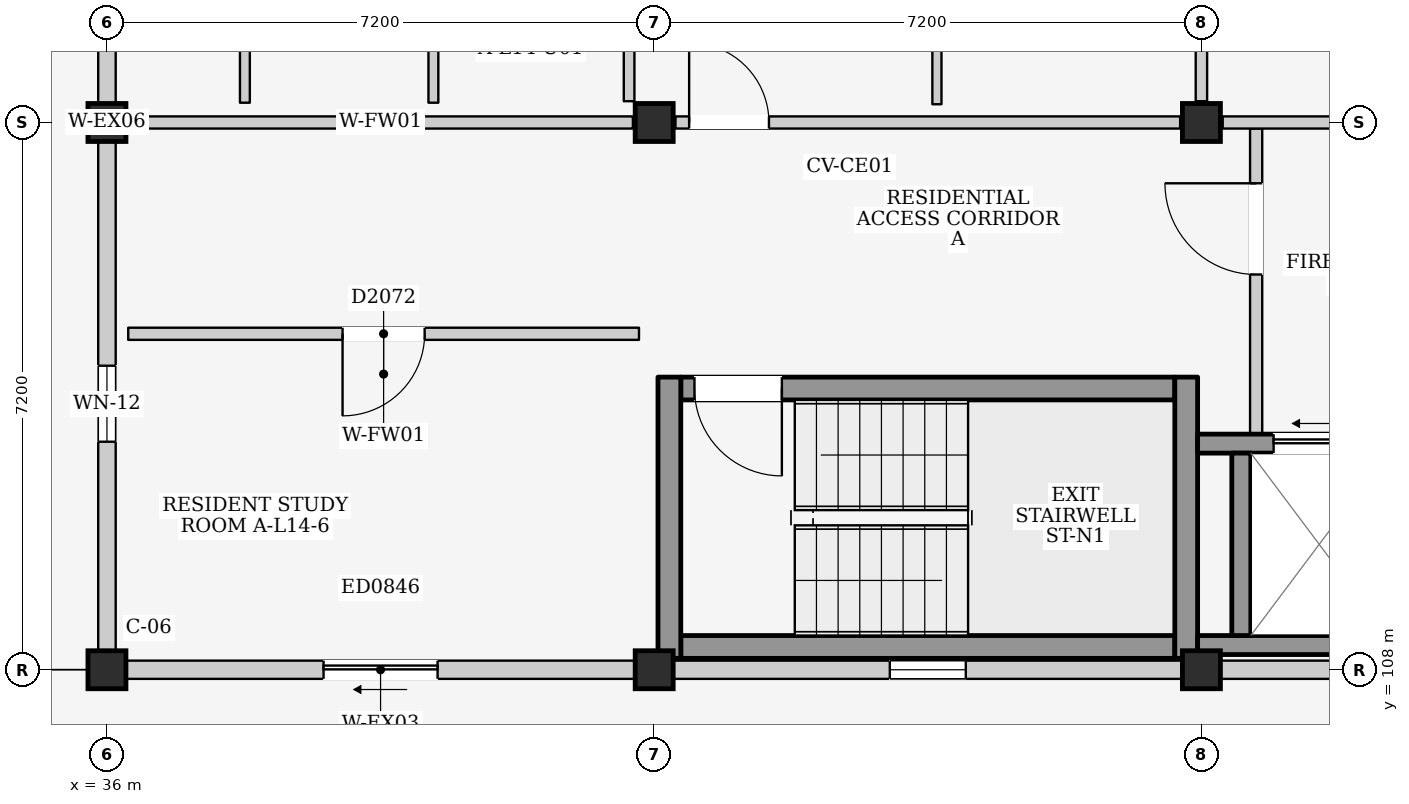
"""IFC4 building model, lengths in metres.
Left out: names, types, materials, properties, quantities, classifications, styles, units other than length and angle.
Written with IfcOpenShell. Run it as: python <this file> out.ifc"""

import sys

from ifc_helpers import new_model, si_unit, direction, frame, frame_2d, origin, origin_2d, place, context, subcontext, project, spatial, rectangle, extrude, element, fill, save


model = new_model("IFC4")
c1 = context("Model", 3, precision=1e-05, world=origin(), true_north=direction((0.0, 1.0)))
c2 = subcontext(c1, "Body", "Model", "MODEL_VIEW")
j1 = project(units=[si_unit("LENGTHUNIT", "METRE"), si_unit("PLANEANGLEUNIT", "RADIAN")], contexts=[c1])
p1 = place(None, origin())
s1 = spatial("IfcSite", under=j1, at=p1, CompositionType="ELEMENT")
p2 = place(p1, origin())
s2 = spatial("IfcBuilding", under=s1, at=p2, CompositionType="ELEMENT")
p3 = place(p2, frame((0.0, 0.0, 47.7)))
s3 = spatial("IfcBuildingStorey", under=s2, at=p3, CompositionType="ELEMENT", Elevation=47.7)
for number, where, z_axis, x_axis in (
    (1, (36.0, 108.0, 0.0), (0.0, 0.0, 1.0), (1.0, 0.0, 0.0)),
    (2, (36.0, 115.2, 0.0), (0.0, 0.0, 1.0), (1.0, 0.0, 0.0)),
    (3, (43.2, 108.0, 0.0), (0.0, 0.0, 1.0), (1.0, 0.0, 0.0)),
    (4, (43.2, 115.2, 0.0), (0.0, 0.0, 1.0), (1.0, 0.0, 0.0)),
    (5, (50.4, 108.0, 0.0), (0.0, 0.0, 1.0), (1.0, 0.0, 0.0)),
    (6, (50.4, 115.2, 0.0), (0.0, 0.0, 1.0), (1.0, 0.0, 0.0)),
):
    element("IfcColumn", number, at=place(p3, frame(where, z_axis=z_axis, x_axis=x_axis)), inside=s3, PredefinedType="COLUMN", context=c2, shape_type="SweptSolid", body=[
        extrude(rectangle(XDim=0.5, YDim=0.5, at=origin_2d()), origin(), (0.0, 0.0, 1.0), 3.2),
    ])
p4 = place(p3, frame((36.25, 108.0, 0.0), z_axis=(0.0, 0.0, 1.0), x_axis=(1.0, 0.0, 0.0)))
e7 = element("IfcWall", 7, at=p4, inside=s3, PredefinedType="ELEMENTEDWALL", context=c2, shape_type="SweptSolid", body=[
    extrude(rectangle(XDim=6.7, YDim=0.24, at=frame_2d((3.35, 0.0))), origin(), (0.0, 0.0, 1.0), 2.335),
])
p5 = place(p4, frame((2.6, 0.0, 0.0)))
e8 = element("IfcOpeningElement", 8, at=p5, cuts=e7, PredefinedType="OPENING", context=c2, shape_type="SweptSolid", body=[
    extrude(rectangle(XDim=1.5, YDim=2.12, at=frame_2d((0.75, 1.06))), frame((0.0, 0.135, 0.0), z_axis=(0.0, -1.0, 0.0), x_axis=(1.0, 0.0, 0.0)), (0.0, 0.0, 1.0), 0.27),
])
p6 = place(p3, frame((43.45, 108.0, 0.0), z_axis=(0.0, 0.0, 1.0), x_axis=(1.0, 0.0, 0.0)))
e9 = element("IfcWall", 9, at=p6, inside=s3, PredefinedType="ELEMENTEDWALL", context=c2, shape_type="SweptSolid", body=[
    extrude(rectangle(XDim=6.7, YDim=0.24, at=frame_2d((3.35, 0.0))), origin(), (0.0, 0.0, 1.0), 2.335),
])
p7 = place(p6, frame((2.85, 0.0, 1.2)))
e10 = element("IfcOpeningElement", 10, at=p7, cuts=e9, PredefinedType="OPENING", context=c2, shape_type="SweptSolid", body=[
    extrude(rectangle(XDim=1.0, YDim=0.9, at=frame_2d((0.5, 0.45))), frame((0.0, 0.135, 0.0), z_axis=(0.0, -1.0, 0.0), x_axis=(1.0, 0.0, 0.0)), (0.0, 0.0, 1.0), 0.27),
])
p8 = place(p3, frame((50.65, 108.0, 0.0), z_axis=(0.0, 0.0, 1.0), x_axis=(1.0, 0.0, 0.0)))
e11 = element("IfcWall", 11, at=p8, inside=s3, PredefinedType="ELEMENTEDWALL", context=c2, shape_type="SweptSolid", body=[
    extrude(rectangle(XDim=6.7, YDim=0.24, at=frame_2d((3.35, 0.0))), origin(), (0.0, 0.0, 1.0), 2.335),
])
p9 = place(p8, frame((2.85, 0.0, 1.2)))
e12 = element("IfcOpeningElement", 12, at=p9, cuts=e11, PredefinedType="OPENING", context=c2, shape_type="SweptSolid", body=[
    extrude(rectangle(XDim=1.0, YDim=0.9, at=frame_2d((0.5, 0.45))), frame((0.0, 0.135, 0.0), z_axis=(0.0, -1.0, 0.0), x_axis=(1.0, 0.0, 0.0)), (0.0, 0.0, 1.0), 0.27),
])
p10 = place(p3, frame((36.0, 108.25, 0.0), z_axis=(0.0, 0.0, 1.0), x_axis=(0.0, 1.0, 0.0)))
e13 = element("IfcWall", 13, at=p10, inside=s3, PredefinedType="ELEMENTEDWALL", context=c2, shape_type="SweptSolid", body=[
    extrude(rectangle(XDim=6.7, YDim=0.23, at=frame_2d((3.35, 0.0))), origin(), (0.0, 0.0, 1.0), 2.485),
])
p11 = place(p10, frame((2.75, 0.0, 1.1)))
e14 = element("IfcOpeningElement", 14, at=p11, cuts=e13, PredefinedType="OPENING", context=c2, shape_type="SweptSolid", body=[
    extrude(rectangle(XDim=1.0, YDim=0.9, at=frame_2d((0.5, 0.45))), frame((0.0, 0.13, 0.0), z_axis=(0.0, -1.0, 0.0), x_axis=(1.0, 0.0, 0.0)), (0.0, 0.0, 1.0), 0.26),
])
p12 = place(p3, frame((36.0, 115.45, 0.0), z_axis=(0.0, 0.0, 1.0), x_axis=(0.0, 1.0, 0.0)))
e15 = element("IfcWall", 15, at=p12, inside=s3, PredefinedType="ELEMENTEDWALL", context=c2, shape_type="SweptSolid", body=[
    extrude(rectangle(XDim=6.7, YDim=0.23, at=frame_2d((3.35, 0.0))), origin(), (0.0, 0.0, 1.0), 2.485),
])
p13 = place(p12, frame((3.6, 0.0, 0.0)))
e16 = element("IfcOpeningElement", 16, at=p13, cuts=e15, PredefinedType="OPENING", context=c2, shape_type="SweptSolid", body=[
    extrude(rectangle(XDim=1.08, YDim=2.12, at=frame_2d((0.54, 1.06))), frame((0.0, 0.13, 0.0), z_axis=(0.0, -1.0, 0.0), x_axis=(1.0, 0.0, 0.0)), (0.0, 0.0, 1.0), 0.26),
])
p14 = place(p3, frame((43.55, 108.3, 0.0), z_axis=(0.0, 0.0, 1.0), x_axis=(1.0, 0.0, 0.0)))
e17 = element("IfcWall", 17, at=p14, inside=s3, PredefinedType="SHEAR", context=c2, shape_type="SweptSolid", body=[
    extrude(rectangle(XDim=6.5, YDim=0.3, at=frame_2d((3.25, 0.0))), origin(), (0.0, 0.0, 1.0), 3.0),
])
p15 = place(p3, frame((43.55, 111.7, 0.0), z_axis=(0.0, 0.0, 1.0), x_axis=(1.0, 0.0, 0.0)))
e18 = element("IfcWall", 18, at=p15, inside=s3, PredefinedType="SHEAR", context=c2, shape_type="SweptSolid", body=[
    extrude(rectangle(XDim=6.5, YDim=0.3, at=frame_2d((3.25, 0.0))), origin(), (0.0, 0.0, 1.0), 3.0),
])
p16 = place(p15, frame((0.18, 0.0, 0.0)))
e19 = element("IfcOpeningElement", 19, at=p16, cuts=e18, PredefinedType="OPENING", context=c2, shape_type="SweptSolid", body=[
    extrude(rectangle(XDim=1.15, YDim=2.2, at=frame_2d((0.575, 1.1))), frame((0.0, 0.165, 0.0), z_axis=(0.0, -1.0, 0.0), x_axis=(1.0, 0.0, 0.0)), (0.0, 0.0, 1.0), 0.33),
])
for number, where, z_axis, x_axis in (
    (20, (43.4, 108.15, 0.0), (0.0, 0.0, 1.0), (0.0, 1.0, 0.0)),
    (21, (50.2, 108.15, 0.0), (0.0, 0.0, 1.0), (0.0, 1.0, 0.0)),
):
    element("IfcWall", number, at=place(p3, frame(where, z_axis=z_axis, x_axis=x_axis)), inside=s3, PredefinedType="SHEAR", context=c2, shape_type="SweptSolid", body=[
        extrude(rectangle(XDim=3.7, YDim=0.3, at=frame_2d((1.85, 0.0))), origin(), (0.0, 0.0, 1.0), 3.0),
    ])
p17 = place(p3, frame((51.12, 111.1, 0.0), z_axis=(0.0, 0.0, 1.0), x_axis=(0.0, 1.0, 0.0)))
e22 = element("IfcWall", 22, at=p17, inside=s3, PredefinedType="PARTITIONING", context=c2, shape_type="SweptSolid", body=[
    extrude(rectangle(XDim=4.02, YDim=0.16, at=frame_2d((2.01, 0.0))), origin(), (0.0, 0.0, 1.0), 3.0),
])
p18 = place(p17, frame((2.1, 0.0, 0.0)))
e23 = element("IfcOpeningElement", 23, at=p18, cuts=e22, PredefinedType="OPENING", context=c2, shape_type="SweptSolid", body=[
    extrude(rectangle(XDim=1.2, YDim=2.2, at=frame_2d((0.6, 1.1))), frame((0.0, 0.095, 0.0), z_axis=(0.0, -1.0, 0.0), x_axis=(1.0, 0.0, 0.0)), (0.0, 0.0, 1.0), 0.19),
])
p19 = place(p3, frame((50.35, 108.325, 0.0), z_axis=(0.0, 0.0, 1.0), x_axis=(1.0, 0.0, 0.0)))
e24 = element("IfcWall", 24, at=p19, inside=s3, PredefinedType="SHEAR", context=c2, shape_type="SweptSolid", body=[
    extrude(rectangle(XDim=2.675, YDim=0.25, at=frame_2d((1.337, 0.0))), origin(), (0.0, 0.0, 1.0), 3.0),
])
p20 = place(p3, frame((50.35, 110.975, 0.0), z_axis=(0.0, 0.0, 1.0), x_axis=(1.0, 0.0, 0.0)))
e25 = element("IfcWall", 25, at=p20, inside=s3, PredefinedType="SHEAR", context=c2, shape_type="SweptSolid", body=[
    extrude(rectangle(XDim=2.675, YDim=0.25, at=frame_2d((1.337, 0.0))), origin(), (0.0, 0.0, 1.0), 3.0),
])
p21 = place(p20, frame((1.0, 0.0, 0.0)))
e26 = element("IfcOpeningElement", 26, at=p21, cuts=e25, PredefinedType="OPENING", context=c2, shape_type="SweptSolid", body=[
    extrude(rectangle(XDim=1.2, YDim=2.25, at=frame_2d((0.6, 1.125))), frame((0.0, 0.14, 0.0), z_axis=(0.0, -1.0, 0.0), x_axis=(1.0, 0.0, 0.0)), (0.0, 0.0, 1.0), 0.28),
])
p22 = place(p3, frame((50.925, 108.45, 0.0), z_axis=(0.0, 0.0, 1.0), x_axis=(0.0, 1.0, 0.0)))
e27 = element("IfcWall", 27, at=p22, inside=s3, PredefinedType="SHEAR", context=c2, shape_type="SweptSolid", body=[
    extrude(rectangle(XDim=2.4, YDim=0.25, at=frame_2d((1.2, 0.0))), origin(), (0.0, 0.0, 1.0), 3.0),
])
p23 = place(p3, frame((36.28, 115.2, 0.0), z_axis=(0.0, 0.0, 1.0), x_axis=(1.0, 0.0, 0.0)))
e28 = element("IfcWall", 28, at=p23, inside=s3, PredefinedType="PARTITIONING", context=c2, shape_type="SweptSolid", body=[
    extrude(rectangle(XDim=6.64, YDim=0.16, at=frame_2d((3.32, 0.0))), origin(), (0.0, 0.0, 1.0), 2.335),
])
p24 = place(p3, frame((43.48, 115.2, 0.0), z_axis=(0.0, 0.0, 1.0), x_axis=(1.0, 0.0, 0.0)))
e29 = element("IfcWall", 29, at=p24, inside=s3, PredefinedType="PARTITIONING", context=c2, shape_type="SweptSolid", body=[
    extrude(rectangle(XDim=6.64, YDim=0.16, at=frame_2d((3.32, 0.0))), origin(), (0.0, 0.0, 1.0), 2.335),
])
p25 = place(p24, frame((0.18, 0.0, 0.0)))
e30 = element("IfcOpeningElement", 30, at=p25, cuts=e29, PredefinedType="OPENING", context=c2, shape_type="SweptSolid", body=[
    extrude(rectangle(XDim=1.05, YDim=2.15, at=frame_2d((0.525, 1.075))), frame((0.0, 0.095, 0.0), z_axis=(0.0, -1.0, 0.0), x_axis=(1.0, 0.0, 0.0)), (0.0, 0.0, 1.0), 0.19),
])
p26 = place(p3, frame((50.4, 115.48, 0.0), z_axis=(0.0, 0.0, 1.0), x_axis=(0.0, 1.0, 0.0)))
e31 = element("IfcWall", 31, at=p26, inside=s3, PredefinedType="PARTITIONING", context=c2, shape_type="SweptSolid", body=[
    extrude(rectangle(XDim=6.64, YDim=0.15, at=frame_2d((3.32, 0.0))), origin(), (0.0, 0.0, 1.0), 2.485),
])
for number, where, z_axis, x_axis in (
    (32, (40.295, 115.46, 0.0), (0.0, 0.0, 1.0), (0.0, 1.0, 0.0)),
    (33, (37.815, 115.46, 0.0), (0.0, 0.0, 1.0), (0.0, 1.0, 0.0)),
):
    element("IfcWall", number, at=place(p3, frame(where, z_axis=z_axis, x_axis=x_axis)), inside=s3, PredefinedType="PARTITIONING", context=c2, shape_type="SweptSolid", body=[
        extrude(rectangle(XDim=3.04, YDim=0.13, at=frame_2d((1.52, 0.0))), origin(), (0.0, 0.0, 1.0), 3.0),
    ])
p27 = place(p3, frame((42.87, 115.48, 0.0), z_axis=(0.0, 0.0, 1.0), x_axis=(0.0, 1.0, 0.0)))
e34 = element("IfcWall", 34, at=p27, inside=s3, PredefinedType="PARTITIONING", context=c2, shape_type="SweptSolid", body=[
    extrude(rectangle(XDim=3.01, YDim=0.14, at=frame_2d((1.505, 0.0))), origin(), (0.0, 0.0, 1.0), 3.0),
])
p28 = place(p3, frame((46.92, 115.44, 0.0), z_axis=(0.0, 0.0, 1.0), x_axis=(0.0, 1.0, 0.0)))
e35 = element("IfcWall", 35, at=p28, inside=s3, PredefinedType="PARTITIONING", context=c2, shape_type="SweptSolid", body=[
    extrude(rectangle(XDim=3.04, YDim=0.12, at=frame_2d((1.52, 0.0))), origin(), (0.0, 0.0, 1.0), 3.0),
])
p29 = place(p28, frame((1.04, 0.0, 0.0)))
e36 = element("IfcOpeningElement", 36, at=p29, cuts=e35, PredefinedType="OPENING", context=c2, shape_type="SweptSolid", body=[
    extrude(rectangle(XDim=0.96, YDim=2.15, at=frame_2d((0.48, 1.075))), frame((0.0, 0.075, 0.0), z_axis=(0.0, -1.0, 0.0), x_axis=(1.0, 0.0, 0.0)), (0.0, 0.0, 1.0), 0.15),
])
p30 = place(p3, frame((50.68, 115.2, 0.0), z_axis=(0.0, 0.0, 1.0), x_axis=(1.0, 0.0, 0.0)))
e37 = element("IfcWall", 37, at=p30, inside=s3, PredefinedType="PARTITIONING", context=c2, shape_type="SweptSolid", body=[
    extrude(rectangle(XDim=6.64, YDim=0.16, at=frame_2d((3.32, 0.0))), origin(), (0.0, 0.0, 1.0), 2.335),
])
p31 = place(p30, frame((2.795, 0.0, 0.0)))
e38 = element("IfcOpeningElement", 38, at=p31, cuts=e37, PredefinedType="OPENING", context=c2, shape_type="SweptSolid", body=[
    extrude(rectangle(XDim=1.05, YDim=2.15, at=frame_2d((0.525, 1.075))), frame((0.0, 0.095, 0.0), z_axis=(0.0, -1.0, 0.0), x_axis=(1.0, 0.0, 0.0)), (0.0, 0.0, 1.0), 0.19),
])
p32 = place(p3, frame((36.28, 112.42, 0.0), z_axis=(0.0, 0.0, 1.0), x_axis=(1.0, 0.0, 0.0)))
e39 = element("IfcWall", 39, at=p32, inside=s3, PredefinedType="PARTITIONING", context=c2, shape_type="SweptSolid", body=[
    extrude(rectangle(XDim=6.72, YDim=0.16, at=frame_2d((3.36, 0.0))), origin(), (0.0, 0.0, 1.0), 3.0),
])
p33 = place(p32, frame((2.82, 0.0, 0.0)))
e40 = element("IfcOpeningElement", 40, at=p33, cuts=e39, PredefinedType="OPENING", context=c2, shape_type="SweptSolid", body=[
    extrude(rectangle(XDim=1.08, YDim=2.22, at=frame_2d((0.54, 1.11))), frame((0.0, 0.095, 0.0), z_axis=(0.0, -1.0, 0.0), x_axis=(1.0, 0.0, 0.0)), (0.0, 0.0, 1.0), 0.19),
])
p34 = place(p5, frame((1.5, 0.0, 0.0), z_axis=(0.0, 0.0, 1.0), x_axis=(-1.0, 0.0, 0.0)))
e41 = element("IfcDoor", 41, at=p34, inside=s3, OperationType="SLIDING_TO_LEFT", PredefinedType="DOOR", context=c2, shape_type="SweptSolid", body=[
    extrude(rectangle(XDim=1.5, YDim=2.12, at=frame_2d((0.75, 1.06))), frame((0.0, 0.025, 0.0), z_axis=(0.0, -1.0, 0.0), x_axis=(1.0, 0.0, 0.0)), (0.0, 0.0, 1.0), 0.05),
])
fill(e8, e41)
p35 = place(p7, origin())
e42 = element("IfcWindow", 42, at=p35, inside=s3, PartitioningType="SINGLE_PANEL", PredefinedType="WINDOW", context=c2, shape_type="SweptSolid", body=[
    extrude(rectangle(XDim=1.0, YDim=0.9, at=frame_2d((0.5, 0.45))), frame((0.0, 0.03, 0.0), z_axis=(0.0, -1.0, 0.0), x_axis=(1.0, 0.0, 0.0)), (0.0, 0.0, 1.0), 0.06),
])
fill(e10, e42)
p36 = place(p11, origin())
e43 = element("IfcWindow", 43, at=p36, inside=s3, PartitioningType="SINGLE_PANEL", PredefinedType="WINDOW", context=c2, shape_type="SweptSolid", body=[
    extrude(rectangle(XDim=1.0, YDim=0.9, at=frame_2d((0.5, 0.45))), frame((0.0, 0.03, 0.0), z_axis=(0.0, -1.0, 0.0), x_axis=(1.0, 0.0, 0.0)), (0.0, 0.0, 1.0), 0.06),
])
fill(e14, e43)
p37 = place(p16, frame((1.15, 0.0, 0.0), z_axis=(0.0, 0.0, 1.0), x_axis=(-1.0, 0.0, 0.0)))
e44 = element("IfcDoor", 44, at=p37, inside=s3, OperationType="SINGLE_SWING_LEFT", PredefinedType="DOOR", context=c2, shape_type="SweptSolid", body=[
    extrude(rectangle(XDim=1.15, YDim=2.2, at=frame_2d((0.575, 1.1))), frame((0.0, 0.025, 0.0), z_axis=(0.0, -1.0, 0.0), x_axis=(1.0, 0.0, 0.0)), (0.0, 0.0, 1.0), 0.05),
])
fill(e19, e44)
p38 = place(p18, origin())
e45 = element("IfcDoor", 45, at=p38, inside=s3, OperationType="SINGLE_SWING_RIGHT", PredefinedType="DOOR", context=c2, shape_type="SweptSolid", body=[
    extrude(rectangle(XDim=1.2, YDim=2.2, at=frame_2d((0.6, 1.1))), frame((0.0, 0.025, 0.0), z_axis=(0.0, -1.0, 0.0), x_axis=(1.0, 0.0, 0.0)), (0.0, 0.0, 1.0), 0.05),
])
fill(e23, e45)
p39 = place(p21, origin())
e46 = element("IfcDoor", 46, at=p39, inside=s3, OperationType="SLIDING_TO_LEFT", PredefinedType="DOOR", context=c2, shape_type="SweptSolid", body=[
    extrude(rectangle(XDim=1.2, YDim=2.25, at=frame_2d((0.6, 1.125))), frame((0.0, 0.025, 0.0), z_axis=(0.0, -1.0, 0.0), x_axis=(1.0, 0.0, 0.0)), (0.0, 0.0, 1.0), 0.05),
])
fill(e26, e46)
p40 = place(p25, origin())
e47 = element("IfcDoor", 47, at=p40, inside=s3, OperationType="SINGLE_SWING_LEFT", PredefinedType="DOOR", context=c2, shape_type="SweptSolid", body=[
    extrude(rectangle(XDim=1.05, YDim=2.15, at=frame_2d((0.525, 1.075))), frame((0.0, 0.025, 0.0), z_axis=(0.0, -1.0, 0.0), x_axis=(1.0, 0.0, 0.0)), (0.0, 0.0, 1.0), 0.05),
])
fill(e30, e47)
p41 = place(p33, frame((1.08, 0.0, 0.0), z_axis=(0.0, 0.0, 1.0), x_axis=(-1.0, 0.0, 0.0)))
e48 = element("IfcDoor", 48, at=p41, inside=s3, OperationType="SINGLE_SWING_RIGHT", PredefinedType="DOOR", context=c2, shape_type="SweptSolid", body=[
    extrude(rectangle(XDim=1.08, YDim=2.22, at=frame_2d((0.54, 1.11))), frame((0.0, 0.025, 0.0), z_axis=(0.0, -1.0, 0.0), x_axis=(1.0, 0.0, 0.0)), (0.0, 0.0, 1.0), 0.05),
])
fill(e40, e48)
save(model, sys.argv[1])
